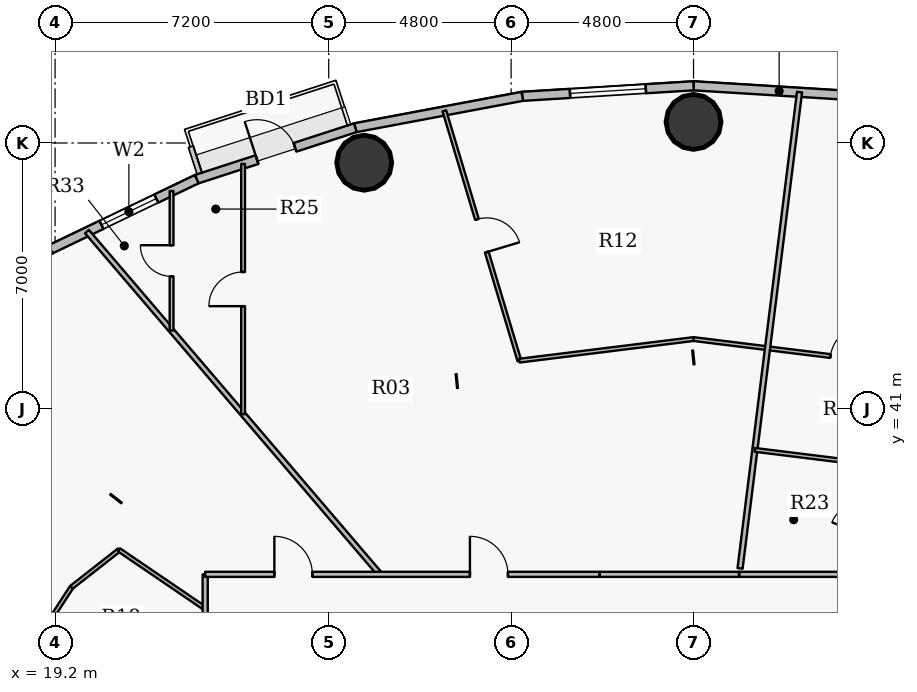
"""IFC4 building model, lengths in metres.
Left out: names, types, materials, properties, quantities, classifications, styles, units other than length and angle.
Written with IfcOpenShell. Run it as: python <this file> out.ifc"""

import sys

from ifc_helpers import new_model, si_unit, direction, frame, frame_2d, origin, origin_2d, place, context, subcontext, project, spatial, rectangle, hollow_circle, extrude, source, transform, mapped, element, fill, save


model = new_model("IFC4")
c1 = context("Model", 3, precision=1e-05, world=origin(), true_north=direction((0.0, 1.0)))
c2 = subcontext(c1, "Body", "Model", "MODEL_VIEW")
j1 = project(units=[si_unit("LENGTHUNIT", "METRE"), si_unit("PLANEANGLEUNIT", "RADIAN")], contexts=[c1])
p1 = place(None, origin())
s1 = spatial("IfcSite", under=j1, at=p1, CompositionType="ELEMENT")
p2 = place(p1, origin())
s2 = spatial("IfcBuilding", under=s1, at=p2, CompositionType="ELEMENT")
p3 = place(p2, frame((0.0, 0.0, 97.2)))
s3 = spatial("IfcBuildingStorey", under=s2, at=p3, CompositionType="ELEMENT", Elevation=97.2)
for number, where, z_axis, x_axis in (
    (1, (36.0, 48.555, 0.0), (0.0, 0.0, 1.0), (1.0, 0.0, 0.0)),
    (2, (27.334, 47.481, 0.0), (0.0, 0.0, 1.0), (1.0, 0.0, 0.0)),
):
    element("IfcColumn", number, at=place(p3, frame(where, z_axis=z_axis, x_axis=x_axis)), inside=s3, PredefinedType="COLUMN", context=c2, shape_type="SweptSolid", body=[
        extrude(hollow_circle(Radius=0.725, WallThickness=0.042, at=origin_2d()), origin(), (0.0, 0.0, 1.0), 3.75),
    ])
p4 = place(p3, frame((36.0, 49.505, 0.0), z_axis=(0.0, 0.0, 1.0), x_axis=(0.998107531589, -0.061492726276, 0.0)))
e3 = element("IfcWall", 3, at=p4, inside=s3, PredefinedType="SOLIDWALL", context=c2, shape_type="SweptSolid", body=[
    extrude(rectangle(XDim=4.514, YDim=0.24, at=frame_2d((2.257, 0.0))), origin(), (0.0, 0.0, 1.0), 3.5),
])
p5 = place(p3, frame((31.494, 49.227, 0.0), z_axis=(0.0, 0.0, 1.0), x_axis=(0.998107531589, 0.061492726276, 0.0)))
e4 = element("IfcWall", 4, at=p5, inside=s3, PredefinedType="SOLIDWALL", context=c2, shape_type="SweptSolid", body=[
    extrude(rectangle(XDim=4.514, YDim=0.24, at=frame_2d((2.257, 0.0))), origin(), (0.0, 0.0, 1.0), 3.5),
])
p6 = place(p5, frame((1.257, 0.0, 0.9)))
e5 = element("IfcOpeningElement", 5, at=p6, cuts=e4, PredefinedType="OPENING", context=c2, shape_type="SweptSolid", body=[
    extrude(rectangle(XDim=2.0, YDim=1.75, at=origin_2d()), frame((1.0, 0.13, 0.875), z_axis=(0.0, -1.0, 0.0), x_axis=(1.0, 0.0, 0.0)), (0.0, 0.0, 1.0), 0.26),
])
p7 = place(p3, frame((27.1, 48.401, 0.0), z_axis=(0.0, 0.0, 1.0), x_axis=(0.982789252177, 0.184730305596, 0.0)))
e6 = element("IfcWall", 6, at=p7, inside=s3, PredefinedType="SOLIDWALL", context=c2, shape_type="SweptSolid", body=[
    extrude(rectangle(XDim=4.471, YDim=0.24, at=frame_2d((2.235, 0.0))), origin(), (0.0, 0.0, 1.0), 3.5),
])
p8 = place(p3, frame((22.926, 47.047, 0.0), z_axis=(0.0, 0.0, 1.0), x_axis=(0.951211346073, 0.308540070495, 0.0)))
e7 = element("IfcWall", 7, at=p8, inside=s3, PredefinedType="SOLIDWALL", context=c2, shape_type="SweptSolid", body=[
    extrude(rectangle(XDim=4.388, YDim=0.24, at=frame_2d((2.194, 0.0))), origin(), (0.0, 0.0, 1.0), 3.5),
])
p9 = place(p8, frame((1.669, 0.0, 0.0)))
e8 = element("IfcOpeningElement", 8, at=p9, cuts=e7, PredefinedType="OPENING", context=c2, shape_type="SweptSolid", body=[
    extrude(rectangle(XDim=1.05, YDim=2.15, at=origin_2d()), frame((0.525, 0.13, 1.075), z_axis=(0.0, -1.0, 0.0), x_axis=(1.0, 0.0, 0.0)), (0.0, 0.0, 1.0), 0.26),
])
p10 = place(p3, frame((19.075, 45.199, 0.0), z_axis=(0.0, 0.0, 1.0), x_axis=(0.901589935876, 0.432591709962, 0.0)))
e9 = element("IfcWall", 9, at=p10, inside=s3, PredefinedType="SOLIDWALL", context=c2, shape_type="SweptSolid", body=[
    extrude(rectangle(XDim=4.272, YDim=0.24, at=frame_2d((2.136, 0.0))), origin(), (0.0, 0.0, 1.0), 3.5),
])
p11 = place(p10, frame((1.493, 0.0, 0.9)))
e10 = element("IfcOpeningElement", 10, at=p11, cuts=e9, PredefinedType="OPENING", context=c2, shape_type="SweptSolid", body=[
    extrude(rectangle(XDim=1.6, YDim=1.75, at=origin_2d()), frame((0.8, 0.13, 0.875), z_axis=(0.0, -1.0, 0.0), x_axis=(1.0, 0.0, 0.0)), (0.0, 0.0, 1.0), 0.26),
])
p12 = place(p3, frame((15.642, 42.903, 0.0), z_axis=(0.0, 0.0, 1.0), x_axis=(0.831221811447, 0.555940914284, 0.0)))
e11 = element("IfcWall", 11, at=p12, inside=s3, PredefinedType="SOLIDWALL", context=c2, shape_type="SweptSolid", body=[
    extrude(rectangle(XDim=4.13, YDim=0.24, at=frame_2d((2.065, 0.0))), origin(), (0.0, 0.0, 1.0), 3.5),
])
p13 = place(p12, frame((1.065, 0.0, 0.9)))
e12 = element("IfcOpeningElement", 12, at=p13, cuts=e11, PredefinedType="OPENING", context=c2, shape_type="SweptSolid", body=[
    extrude(rectangle(XDim=2.0, YDim=1.75, at=origin_2d()), frame((1.0, 0.13, 0.875), z_axis=(0.0, -1.0, 0.0), x_axis=(1.0, 0.0, 0.0)), (0.0, 0.0, 1.0), 0.26),
])
p14 = place(p3, frame((9.741, 36.057, 0.0), z_axis=(0.0, 0.0, 1.0), x_axis=(0.945349748634, -0.326058051207, 0.0)))
e13 = element("IfcWall", 13, at=p14, inside=s3, PredefinedType="PARTITIONING", context=c2, shape_type="SweptSolid", body=[
    extrude(rectangle(XDim=14.184, YDim=0.135, at=frame_2d((7.092, 0.0))), origin(), (0.0, 0.0, 1.0), 2.935),
])
p15 = place(p3, frame((16.76, 31.895, 0.0), z_axis=(0.0, 0.0, 1.0), x_axis=(0.545405249109, 0.838172484781, 0.0)))
e14 = element("IfcWall", 14, at=p15, inside=s3, PredefinedType="PARTITIONING", context=c2, shape_type="SweptSolid", body=[
    extrude(rectangle(XDim=5.269, YDim=0.1, at=frame_2d((2.634, 0.0))), origin(), (0.0, 0.0, 1.0), 2.935),
])
p16 = place(p15, frame((3.012, 0.0, 0.0)))
e15 = element("IfcOpeningElement", 15, at=p16, cuts=e14, PredefinedType="OPENING", context=c2, shape_type="SweptSolid", body=[
    extrude(rectangle(XDim=0.9, YDim=2.1, at=origin_2d()), frame((0.45, 0.06, 1.05), z_axis=(0.0, -1.0, 0.0), x_axis=(1.0, 0.0, 0.0)), (0.0, 0.0, 1.0), 0.12),
])
p17 = place(p3, frame((19.634, 36.311, 0.0), z_axis=(0.0, 0.0, 1.0), x_axis=(0.787313775385, 0.616552527437, 0.0)))
e16 = element("IfcWall", 16, at=p17, inside=s3, PredefinedType="PARTITIONING", context=c2, shape_type="SweptSolid", body=[
    extrude(rectangle(XDim=1.59, YDim=0.1, at=frame_2d((0.795, 0.0))), origin(), (0.0, 0.0, 1.0), 3.5),
])
p18 = place(p3, frame((20.04, 45.668, 0.0), z_axis=(0.0, 0.0, 1.0), x_axis=(0.649828321201, -0.760081017369, 0.0)))
e17 = element("IfcWall", 17, at=p18, inside=s3, PredefinedType="PARTITIONING", context=c2, shape_type="SweptSolid", body=[
    extrude(rectangle(XDim=11.865, YDim=0.135, at=frame_2d((5.932, 0.0))), origin(), (0.0, 0.0, 1.0), 2.935),
])
p19 = place(p3, frame((20.885, 37.291, 0.0), z_axis=(0.0, 0.0, 1.0), x_axis=(0.826581607155, -0.562816885596, 0.0)))
e18 = element("IfcWall", 18, at=p19, inside=s3, PredefinedType="PARTITIONING", context=c2, shape_type="SweptSolid", body=[
    extrude(rectangle(XDim=2.74, YDim=0.1, at=frame_2d((1.37, 0.0))), origin(), (0.0, 0.0, 1.0), 3.5),
])
p20 = place(p3, frame((22.265, 43.064, 0.0), z_axis=(0.0, 0.0, 1.0), x_axis=(0.0, 1.0, 0.0)))
e19 = element("IfcWall", 19, at=p20, inside=s3, PredefinedType="PARTITIONING", context=c2, shape_type="SweptSolid", body=[
    extrude(rectangle(XDim=3.671, YDim=0.1, at=frame_2d((1.836, 0.0))), origin(), (0.0, 0.0, 1.0), 2.935),
])
p21 = place(p20, frame((1.426, 0.0, 0.0)))
e20 = element("IfcOpeningElement", 20, at=p21, cuts=e19, PredefinedType="OPENING", context=c2, shape_type="SweptSolid", body=[
    extrude(rectangle(XDim=0.82, YDim=2.1, at=origin_2d()), frame((0.41, 0.06, 1.05), z_axis=(0.0, -1.0, 0.0), x_axis=(1.0, 0.0, 0.0)), (0.0, 0.0, 1.0), 0.12),
])
p22 = place(p3, frame((23.15, 17.35, 0.0), z_axis=(0.0, 0.0, 1.0), x_axis=(0.0, 1.0, 0.0)))
e21 = element("IfcWall", 21, at=p22, inside=s3, PredefinedType="PARTITIONING", context=c2, shape_type="SweptSolid", body=[
    extrude(rectangle(XDim=19.3, YDim=0.135, at=frame_2d((9.65, 0.0))), origin(), (0.0, 0.0, 1.0), 2.935),
])
p23 = place(p22, frame((7.86, 0.0, 0.0)))
e22 = element("IfcOpeningElement", 22, at=p23, cuts=e21, PredefinedType="OPENING", context=c2, shape_type="SweptSolid", body=[
    extrude(rectangle(XDim=1.0, YDim=2.15, at=origin_2d()), frame((0.5, 0.078, 1.075), z_axis=(0.0, -1.0, 0.0), x_axis=(1.0, 0.0, 0.0)), (0.0, 0.0, 1.0), 0.155),
])
p24 = place(p3, frame((23.15, 36.65, 0.0), z_axis=(0.0, 0.0, 1.0), x_axis=(1.0, 0.0, 0.0)))
e23 = element("IfcWall", 23, at=p24, inside=s3, PredefinedType="PARTITIONING", context=c2, shape_type="SweptSolid", body=[
    extrude(rectangle(XDim=10.373, YDim=0.135, at=frame_2d((5.187, 0.0))), origin(), (0.0, 0.0, 1.0), 2.935),
])
p25 = place(p24, frame((6.966, 0.0, 0.0)))
e24 = element("IfcOpeningElement", 24, at=p25, cuts=e23, PredefinedType="OPENING", context=c2, shape_type="SweptSolid", body=[
    extrude(rectangle(XDim=1.0, YDim=2.15, at=origin_2d()), frame((0.5, 0.078, 1.075), z_axis=(0.0, -1.0, 0.0), x_axis=(1.0, 0.0, 0.0)), (0.0, 0.0, 1.0), 0.155),
])
p26 = place(p24, frame((1.82, 0.0, 0.0)))
e25 = element("IfcOpeningElement", 25, at=p26, cuts=e23, PredefinedType="OPENING", context=c2, shape_type="SweptSolid", body=[
    extrude(rectangle(XDim=1.0, YDim=2.15, at=origin_2d()), frame((0.5, 0.078, 1.075), z_axis=(0.0, -1.0, 0.0), x_axis=(1.0, 0.0, 0.0)), (0.0, 0.0, 1.0), 0.155),
])
p27 = place(p3, frame((24.147, 40.864, 0.0), z_axis=(0.0, 0.0, 1.0), x_axis=(0.0, 1.0, 0.0)))
e26 = element("IfcWall", 26, at=p27, inside=s3, PredefinedType="PARTITIONING", context=c2, shape_type="SweptSolid", body=[
    extrude(rectangle(XDim=6.585, YDim=0.1, at=frame_2d((3.292, 0.0))), origin(), (0.0, 0.0, 1.0), 2.935),
])
p28 = place(p27, frame((2.843, 0.0, 0.0)))
e27 = element("IfcOpeningElement", 27, at=p28, cuts=e26, PredefinedType="OPENING", context=c2, shape_type="SweptSolid", body=[
    extrude(rectangle(XDim=0.9, YDim=2.1, at=origin_2d()), frame((0.45, 0.06, 1.05), z_axis=(0.0, -1.0, 0.0), x_axis=(1.0, 0.0, 0.0)), (0.0, 0.0, 1.0), 0.12),
])
p29 = place(p3, frame((29.443, 48.847, 0.0), z_axis=(0.0, 0.0, 1.0), x_axis=(0.287465357653, -0.957791035743, 0.0)))
e28 = element("IfcWall", 28, at=p29, inside=s3, PredefinedType="PARTITIONING", context=c2, shape_type="SweptSolid", body=[
    extrude(rectangle(XDim=6.864, YDim=0.1, at=frame_2d((3.432, 0.0))), origin(), (0.0, 0.0, 1.0), 2.935),
])
p30 = place(p29, frame((2.982, 0.0, 0.0)))
e29 = element("IfcOpeningElement", 29, at=p30, cuts=e28, PredefinedType="OPENING", context=c2, shape_type="SweptSolid", body=[
    extrude(rectangle(XDim=0.9, YDim=2.1, at=origin_2d()), frame((0.45, 0.06, 1.05), z_axis=(0.0, -1.0, 0.0), x_axis=(1.0, 0.0, 0.0)), (0.0, 0.0, 1.0), 0.12),
])
p31 = place(p3, frame((31.416, 42.272, 0.0), z_axis=(0.0, 0.0, 1.0), x_axis=(0.992393726446, 0.12310439355, 0.0)))
e30 = element("IfcWall", 30, at=p31, inside=s3, PredefinedType="PARTITIONING", context=c2, shape_type="SweptSolid", body=[
    extrude(rectangle(XDim=4.619, YDim=0.1, at=frame_2d((2.31, 0.0))), origin(), (0.0, 0.0, 1.0), 2.935),
])
p32 = place(p3, frame((36.0, 42.841, 0.0), z_axis=(0.0, 0.0, 1.0), x_axis=(0.992393593066, -0.123105468776, 0.0)))
e31 = element("IfcWall", 31, at=p32, inside=s3, PredefinedType="PARTITIONING", context=c2, shape_type="SweptSolid", body=[
    extrude(rectangle(XDim=6.241, YDim=0.1, at=frame_2d((3.121, 0.0))), origin(), (0.0, 0.0, 1.0), 2.935),
])
p33 = place(p32, frame((3.632, 0.0, 0.0)))
e32 = element("IfcOpeningElement", 32, at=p33, cuts=e31, PredefinedType="OPENING", context=c2, shape_type="SweptSolid", body=[
    extrude(rectangle(XDim=0.9, YDim=2.1, at=origin_2d()), frame((0.45, 0.06, 1.05), z_axis=(0.0, -1.0, 0.0), x_axis=(1.0, 0.0, 0.0)), (0.0, 0.0, 1.0), 0.12),
])
p34 = place(p3, frame((37.205, 36.65, 0.0), z_axis=(0.0, 0.0, 1.0), x_axis=(1.0, 0.0, 0.0)))
e33 = element("IfcWall", 33, at=p34, inside=s3, PredefinedType="PARTITIONING", context=c2, shape_type="SweptSolid", body=[
    extrude(rectangle(XDim=11.499, YDim=0.135, at=frame_2d((5.75, 0.0))), origin(), (0.0, 0.0, 1.0), 2.935),
])
p35 = place(p34, frame((3.988, 0.0, 0.0)))
e34 = element("IfcOpeningElement", 34, at=p35, cuts=e33, PredefinedType="OPENING", context=c2, shape_type="SweptSolid", body=[
    extrude(rectangle(XDim=1.0, YDim=2.15, at=origin_2d()), frame((0.5, 0.078, 1.075), z_axis=(0.0, -1.0, 0.0), x_axis=(1.0, 0.0, 0.0)), (0.0, 0.0, 1.0), 0.155),
])
p36 = place(p3, frame((37.224, 36.805, 0.0), z_axis=(0.0, 0.0, 1.0), x_axis=(0.123906262398, 0.992293927291, 0.0)))
e35 = element("IfcWall", 35, at=p36, inside=s3, PredefinedType="PARTITIONING", context=c2, shape_type="SweptSolid", body=[
    extrude(rectangle(XDim=12.63, YDim=0.135, at=frame_2d((6.315, 0.0))), origin(), (0.0, 0.0, 1.0), 2.935),
])
p37 = place(p3, frame((37.614, 39.925, 0.0), z_axis=(0.0, 0.0, 1.0), x_axis=(0.992397148182, -0.123076806427, 0.0)))
e36 = element("IfcWall", 36, at=p37, inside=s3, PredefinedType="PARTITIONING", context=c2, shape_type="SweptSolid", body=[
    extrude(rectangle(XDim=3.545, YDim=0.1, at=frame_2d((1.772, 0.0))), origin(), (0.0, 0.0, 1.0), 3.5),
])
p38 = place(p3, frame((33.533, 36.65, 0.0), z_axis=(0.0, 0.0, 1.0), x_axis=(1.0, 0.0, 0.0)))
e37 = element("IfcWall", 37, at=p38, inside=s3, PredefinedType="PARTITIONING", context=c2, shape_type="SweptSolid", body=[
    extrude(rectangle(XDim=3.662, YDim=0.135, at=frame_2d((1.831, 0.0))), origin(), (0.0, 0.0, 1.0), 2.935),
])
m1 = source(origin(), c2, "Body", "SweptSolid", [
    extrude(rectangle(XDim=2.0, YDim=1.75, at=origin_2d()), frame((1.0, 0.03, 0.875), z_axis=(0.0, -1.0, 0.0), x_axis=(1.0, 0.0, 0.0)), (0.0, 0.0, 1.0), 0.06),
])
p39 = place(p6, origin())
e38 = element("IfcWindow", 38, at=p39, inside=s3, PartitioningType="DOUBLE_PANEL_VERTICAL", PredefinedType="WINDOW", context=c2, shape_type="MappedRepresentation", body=[
    mapped(m1, transform((0.0, 0.0, 0.0), x_axis=(1.0, 0.0, 0.0), y_axis=(0.0, 1.0, 0.0), z_axis=(0.0, 0.0, 1.0), scale=1.0)),
])
fill(e5, e38)
m2 = source(origin(), c2, "Body", "SweptSolid", [
    extrude(rectangle(XDim=1.05, YDim=2.15, at=origin_2d()), frame((0.525, 0.025, 1.075), z_axis=(0.0, -1.0, 0.0), x_axis=(1.0, 0.0, 0.0)), (0.0, 0.0, 1.0), 0.05),
])
p40 = place(p9, origin())
e39 = element("IfcDoor", 39, at=p40, inside=s3, OperationType="SINGLE_SWING_LEFT", PredefinedType="DOOR", context=c2, shape_type="MappedRepresentation", body=[
    mapped(m2, transform((0.0, 0.0, 0.0), x_axis=(1.0, 0.0, 0.0), y_axis=(0.0, 1.0, 0.0), z_axis=(0.0, 0.0, 1.0), scale=1.0)),
])
fill(e8, e39)
m3 = source(origin(), c2, "Body", "SweptSolid", [
    extrude(rectangle(XDim=1.6, YDim=1.75, at=origin_2d()), frame((0.8, 0.03, 0.875), z_axis=(0.0, -1.0, 0.0), x_axis=(1.0, 0.0, 0.0)), (0.0, 0.0, 1.0), 0.06),
])
p41 = place(p11, origin())
e40 = element("IfcWindow", 40, at=p41, inside=s3, PartitioningType="DOUBLE_PANEL_VERTICAL", PredefinedType="WINDOW", context=c2, shape_type="MappedRepresentation", body=[
    mapped(m3, transform((0.0, 0.0, 0.0), x_axis=(1.0, 0.0, 0.0), y_axis=(0.0, 1.0, 0.0), z_axis=(0.0, 0.0, 1.0), scale=1.0)),
])
fill(e10, e40)
m4 = source(origin(), c2, "Body", "SweptSolid", [
    extrude(rectangle(XDim=0.9, YDim=2.1, at=origin_2d()), frame((0.45, 0.025, 1.05), z_axis=(0.0, -1.0, 0.0), x_axis=(1.0, 0.0, 0.0)), (0.0, 0.0, 1.0), 0.05),
])
p42 = place(p33, origin())
e41 = element("IfcDoor", 41, at=p42, inside=s3, OperationType="SINGLE_SWING_RIGHT", PredefinedType="DOOR", context=c2, shape_type="MappedRepresentation", body=[
    mapped(m4, transform((0.0, 0.0, 0.0), x_axis=(1.0, 0.0, 0.0), y_axis=(0.0, 1.0, 0.0), z_axis=(0.0, 0.0, 1.0), scale=1.0)),
])
fill(e32, e41)
m5 = source(origin(), c2, "Body", "SweptSolid", [
    extrude(rectangle(XDim=1.0, YDim=2.15, at=origin_2d()), frame((0.5, 0.025, 1.075), z_axis=(0.0, -1.0, 0.0), x_axis=(1.0, 0.0, 0.0)), (0.0, 0.0, 1.0), 0.05),
])
p43 = place(p25, origin())
e42 = element("IfcDoor", 42, at=p43, inside=s3, OperationType="SINGLE_SWING_LEFT", PredefinedType="DOOR", context=c2, shape_type="MappedRepresentation", body=[
    mapped(m5, transform((0.0, 0.0, 0.0), x_axis=(1.0, 0.0, 0.0), y_axis=(0.0, 1.0, 0.0), z_axis=(0.0, 0.0, 1.0), scale=1.0)),
])
fill(e24, e42)
p44 = place(p30, origin())
e43 = element("IfcDoor", 43, at=p44, inside=s3, OperationType="SINGLE_SWING_RIGHT", PredefinedType="DOOR", context=c2, shape_type="MappedRepresentation", body=[
    mapped(m4, transform((0.0, 0.0, 0.0), x_axis=(1.0, 0.0, 0.0), y_axis=(0.0, 1.0, 0.0), z_axis=(0.0, 0.0, 1.0), scale=1.0)),
])
fill(e29, e43)
p45 = place(p28, origin())
e44 = element("IfcDoor", 44, at=p45, inside=s3, OperationType="SINGLE_SWING_LEFT", PredefinedType="DOOR", context=c2, shape_type="MappedRepresentation", body=[
    mapped(m4, transform((0.0, 0.0, 0.0), x_axis=(1.0, 0.0, 0.0), y_axis=(0.0, 1.0, 0.0), z_axis=(0.0, 0.0, 1.0), scale=1.0)),
])
fill(e27, e44)
m6 = source(origin(), c2, "Body", "SweptSolid", [
    extrude(rectangle(XDim=0.82, YDim=2.1, at=origin_2d()), frame((0.41, 0.025, 1.05), z_axis=(0.0, -1.0, 0.0), x_axis=(1.0, 0.0, 0.0)), (0.0, 0.0, 1.0), 0.05),
])
p46 = place(p21, origin())
e45 = element("IfcDoor", 45, at=p46, inside=s3, OperationType="SINGLE_SWING_RIGHT", PredefinedType="DOOR", context=c2, shape_type="MappedRepresentation", body=[
    mapped(m6, transform((0.0, 0.0, 0.0), x_axis=(1.0, 0.0, 0.0), y_axis=(0.0, 1.0, 0.0), z_axis=(0.0, 0.0, 1.0), scale=1.0)),
])
fill(e20, e45)
p47 = place(p26, origin())
e46 = element("IfcDoor", 46, at=p47, inside=s3, OperationType="SINGLE_SWING_LEFT", PredefinedType="DOOR", context=c2, shape_type="MappedRepresentation", body=[
    mapped(m5, transform((0.0, 0.0, 0.0), x_axis=(1.0, 0.0, 0.0), y_axis=(0.0, 1.0, 0.0), z_axis=(0.0, 0.0, 1.0), scale=1.0)),
])
fill(e25, e46)
save(model, sys.argv[1])
